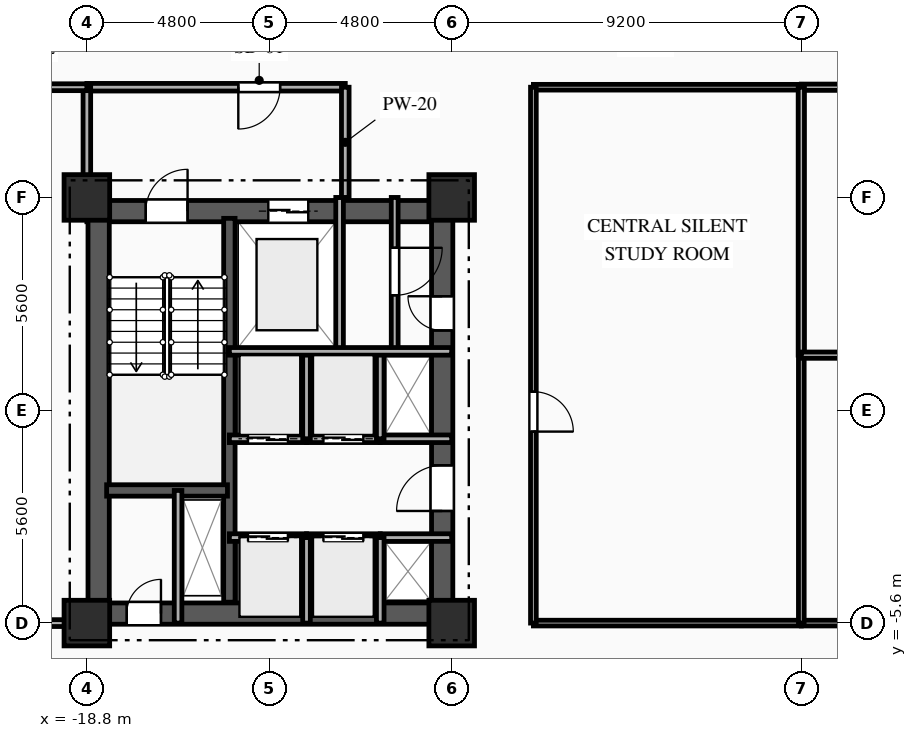
"""IFC4 building model, lengths in metres.
Left out: names, types, materials, properties, quantities, classifications, styles, units other than length and angle.
Written with IfcOpenShell. Run it as: python <this file> out.ifc"""

import sys

from ifc_helpers import new_model, si_unit, direction, frame, frame_2d, origin, origin_2d, place, context, subcontext, project, spatial, rectangle, extrude, element, fill, save


model = new_model("IFC4")
c1 = context("Model", 3, precision=1e-05, world=origin(), true_north=direction((0.0, 1.0)))
c2 = subcontext(c1, "Body", "Model", "MODEL_VIEW")
j1 = project(units=[si_unit("LENGTHUNIT", "METRE"), si_unit("PLANEANGLEUNIT", "RADIAN")], contexts=[c1])
p1 = place(None, origin())
s1 = spatial("IfcSite", under=j1, at=p1, CompositionType="ELEMENT")
p2 = place(p1, origin())
s2 = spatial("IfcBuilding", under=s1, at=p2, CompositionType="ELEMENT")
p3 = place(p2, frame((0.0, 0.0, 30.35)))
s3 = spatial("IfcBuildingStorey", under=s2, at=p3, CompositionType="ELEMENT", Elevation=30.35)
for number, where, z_axis, x_axis in (
    (1, (-18.8, -5.6, 0.0), (0.0, 0.0, 1.0), (1.0, 0.0, 0.0)),
    (2, (-18.8, 5.6, 0.0), (0.0, 0.0, 1.0), (1.0, 0.0, 0.0)),
    (3, (-9.2, -5.6, 0.0), (0.0, 0.0, 1.0), (1.0, 0.0, 0.0)),
    (4, (-9.2, 5.6, 0.0), (0.0, 0.0, 1.0), (1.0, 0.0, 0.0)),
):
    element("IfcColumn", number, at=place(p3, frame(where, z_axis=z_axis, x_axis=x_axis)), inside=s3, PredefinedType="COLUMN", context=c2, shape_type="SweptSolid", body=[
        extrude(rectangle(XDim=1.2, YDim=1.2, at=origin_2d()), origin(), (0.0, 0.0, 1.0), 3.35),
    ])
p4 = place(p3, frame((-18.8, 5.24, 0.0), z_axis=(0.0, 0.0, 1.0), x_axis=(1.0, 0.0, 0.0)))
e5 = element("IfcWall", 5, at=p4, inside=s3, PredefinedType="SHEAR", context=c2, shape_type="SweptSolid", body=[
    extrude(rectangle(XDim=9.6, YDim=0.56, at=frame_2d((4.8, 0.0))), origin(), (0.0, 0.0, 1.0), 3.035),
])
p5 = place(p4, frame((1.55, 0.0, 0.0)))
e6 = element("IfcOpeningElement", 6, at=p5, cuts=e5, PredefinedType="OPENING", context=c2, shape_type="SweptSolid", body=[
    extrude(rectangle(XDim=1.1, YDim=2.15, at=frame_2d((0.55, 1.075))), frame((0.0, 0.29, 0.0), z_axis=(0.0, -1.0, 0.0), x_axis=(1.0, 0.0, 0.0)), (0.0, 0.0, 1.0), 0.58),
])
p6 = place(p4, frame((4.775, 0.0, 0.0)))
e7 = element("IfcOpeningElement", 7, at=p6, cuts=e5, PredefinedType="OPENING", context=c2, shape_type="SweptSolid", body=[
    extrude(rectangle(XDim=1.05, YDim=2.1, at=frame_2d((0.525, 1.05))), frame((0.0, 0.29, 0.0), z_axis=(0.0, -1.0, 0.0), x_axis=(1.0, 0.0, 0.0)), (0.0, 0.0, 1.0), 0.58),
])
p7 = place(p3, frame((-18.8, -5.35, 0.0), z_axis=(0.0, 0.0, 1.0), x_axis=(1.0, 0.0, 0.0)))
e8 = element("IfcWall", 8, at=p7, inside=s3, PredefinedType="SHEAR", context=c2, shape_type="SweptSolid", body=[
    extrude(rectangle(XDim=9.6, YDim=0.56, at=frame_2d((4.8, 0.0))), origin(), (0.0, 0.0, 1.0), 3.035),
])
p8 = place(p7, frame((1.05, 0.0, 0.0)))
e9 = element("IfcOpeningElement", 9, at=p8, cuts=e8, PredefinedType="OPENING", context=c2, shape_type="SweptSolid", body=[
    extrude(rectangle(XDim=0.9, YDim=2.1, at=frame_2d((0.45, 1.05))), frame((0.0, 0.29, 0.0), z_axis=(0.0, -1.0, 0.0), x_axis=(1.0, 0.0, 0.0)), (0.0, 0.0, 1.0), 0.58),
])
p9 = place(p3, frame((-18.49, -5.05, 0.0), z_axis=(0.0, 0.0, 1.0), x_axis=(0.0, 1.0, 0.0)))
e10 = element("IfcWall", 10, at=p9, inside=s3, PredefinedType="SHEAR", context=c2, shape_type="SweptSolid", body=[
    extrude(rectangle(XDim=10.1, YDim=0.56, at=frame_2d((5.05, 0.0))), origin(), (0.0, 0.0, 1.0), 3.035),
])
p10 = place(p3, frame((-9.45, -5.05, 0.0), z_axis=(0.0, 0.0, 1.0), x_axis=(0.0, 1.0, 0.0)))
e11 = element("IfcWall", 11, at=p10, inside=s3, PredefinedType="SHEAR", context=c2, shape_type="SweptSolid", body=[
    extrude(rectangle(XDim=10.1, YDim=0.56, at=frame_2d((5.05, 0.0))), origin(), (0.0, 0.0, 1.0), 3.035),
])
p11 = place(p10, frame((7.15, 0.0, 0.0)))
e12 = element("IfcOpeningElement", 12, at=p11, cuts=e11, PredefinedType="OPENING", context=c2, shape_type="SweptSolid", body=[
    extrude(rectangle(XDim=0.9, YDim=2.1, at=frame_2d((0.45, 1.05))), frame((0.0, 0.29, 0.0), z_axis=(0.0, -1.0, 0.0), x_axis=(1.0, 0.0, 0.0)), (0.0, 0.0, 1.0), 0.58),
])
p12 = place(p10, frame((2.4, 0.0, 0.0)))
e13 = element("IfcOpeningElement", 13, at=p12, cuts=e11, PredefinedType="OPENING", context=c2, shape_type="SweptSolid", body=[
    extrude(rectangle(XDim=1.2, YDim=2.15, at=frame_2d((0.6, 1.075))), frame((0.0, 0.29, 0.0), z_axis=(0.0, -1.0, 0.0), x_axis=(1.0, 0.0, 0.0)), (0.0, 0.0, 1.0), 0.58),
])
p13 = place(p3, frame((-15.05, -5.05, 0.0), z_axis=(0.0, 0.0, 1.0), x_axis=(0.0, 1.0, 0.0)))
e14 = element("IfcWall", 14, at=p13, inside=s3, PredefinedType="SHEAR", context=c2, shape_type="SweptSolid", body=[
    extrude(rectangle(XDim=10.1, YDim=0.3, at=frame_2d((5.05, 0.0))), origin(), (0.0, 0.0, 1.0), 3.035),
])
p14 = place(p3, frame((-18.28, -2.11, 0.0), z_axis=(0.0, 0.0, 1.0), x_axis=(1.0, 0.0, 0.0)))
e15 = element("IfcWall", 15, at=p14, inside=s3, PredefinedType="SHEAR", context=c2, shape_type="SweptSolid", body=[
    extrude(rectangle(XDim=3.18, YDim=0.3, at=frame_2d((1.59, 0.0))), origin(), (0.0, 0.0, 1.0), 3.035),
])
p15 = place(p3, frame((-16.4, -5.6, 0.0), z_axis=(0.0, 0.0, 1.0), x_axis=(0.0, 1.0, 0.0)))
e16 = element("IfcWall", 16, at=p15, inside=s3, PredefinedType="PARTITIONING", context=c2, shape_type="SweptSolid", body=[
    extrude(rectangle(XDim=3.49, YDim=0.2, at=frame_2d((1.745, 0.0))), origin(), (0.0, 0.0, 1.0), 3.035),
])
p16 = place(p3, frame((-12.15, 1.55, 0.0), z_axis=(0.0, 0.0, 1.0), x_axis=(0.0, 1.0, 0.0)))
e17 = element("IfcWall", 17, at=p16, inside=s3, PredefinedType="PARTITIONING", context=c2, shape_type="SweptSolid", body=[
    extrude(rectangle(XDim=4.05, YDim=0.2, at=frame_2d((2.025, 0.0))), origin(), (0.0, 0.0, 1.0), 3.035),
])
p17 = place(p3, frame((-12.0, 8.5, 0.0), z_axis=(0.0, 0.0, 1.0), x_axis=(-1.0, 0.0, 0.0)))
e18 = element("IfcWall", 18, at=p17, inside=s3, PredefinedType="PARTITIONING", context=c2, shape_type="SweptSolid", body=[
    extrude(rectangle(XDim=6.8, YDim=0.2, at=frame_2d((3.4, 0.0))), origin(), (0.0, 0.0, 1.0), 3.035),
])
p18 = place(p17, frame((1.715, 0.0, 0.0)))
e19 = element("IfcOpeningElement", 19, at=p18, cuts=e18, PredefinedType="OPENING", context=c2, shape_type="SweptSolid", body=[
    extrude(rectangle(XDim=1.1, YDim=2.15, at=frame_2d((0.55, 1.075))), frame((0.0, 0.11, 0.0), z_axis=(0.0, -1.0, 0.0), x_axis=(1.0, 0.0, 0.0)), (0.0, 0.0, 1.0), 0.22),
])
p19 = place(p3, frame((-12.0, 5.6, 0.0), z_axis=(0.0, 0.0, 1.0), x_axis=(0.0, 1.0, 0.0)))
e20 = element("IfcWall", 20, at=p19, inside=s3, PredefinedType="PARTITIONING", context=c2, shape_type="SweptSolid", body=[
    extrude(rectangle(XDim=2.9, YDim=0.2, at=frame_2d((1.45, 0.0))), origin(), (0.0, 0.0, 1.0), 3.035),
])
p20 = place(p3, frame((-18.8, 8.5, 0.0), z_axis=(0.0, 0.0, 1.0), x_axis=(0.0, -1.0, 0.0)))
e21 = element("IfcWall", 21, at=p20, inside=s3, PredefinedType="PARTITIONING", context=c2, shape_type="SweptSolid", body=[
    extrude(rectangle(XDim=2.9, YDim=0.2, at=frame_2d((1.45, 0.0))), origin(), (0.0, 0.0, 1.0), 2.52),
])
p21 = place(p3, frame((-10.7, 5.6, 0.0), z_axis=(0.0, 0.0, 1.0), x_axis=(0.0, -1.0, 0.0)))
e22 = element("IfcWall", 22, at=p21, inside=s3, PredefinedType="PARTITIONING", context=c2, shape_type="SweptSolid", body=[
    extrude(rectangle(XDim=4.05, YDim=0.18, at=frame_2d((2.025, 0.0))), origin(), (0.0, 0.0, 1.0), 3.035),
])
p22 = place(p21, frame((1.325, 0.0, 0.0)))
e23 = element("IfcOpeningElement", 23, at=p22, cuts=e22, PredefinedType="OPENING", context=c2, shape_type="SweptSolid", body=[
    extrude(rectangle(XDim=1.25, YDim=2.2, at=frame_2d((0.625, 1.1))), frame((0.0, 0.1, 0.0), z_axis=(0.0, -1.0, 0.0), x_axis=(1.0, 0.0, 0.0)), (0.0, 0.0, 1.0), 0.2),
])
p23 = place(p3, frame((-15.05, -3.35, 0.0), z_axis=(0.0, 0.0, 1.0), x_axis=(1.0, 0.0, 0.0)))
e24 = element("IfcWall", 24, at=p23, inside=s3, PredefinedType="PARTITIONING", context=c2, shape_type="SweptSolid", body=[
    extrude(rectangle(XDim=2.03, YDim=0.2, at=frame_2d((1.015, 0.0))), origin(), (0.0, 0.0, 1.0), 3.035),
])
p24 = place(p23, frame((0.49, 0.0, 0.0)))
e25 = element("IfcOpeningElement", 25, at=p24, cuts=e24, PredefinedType="OPENING", context=c2, shape_type="SweptSolid", body=[
    extrude(rectangle(XDim=1.05, YDim=2.1, at=frame_2d((0.525, 1.05))), frame((0.0, 0.11, 0.0), z_axis=(0.0, -1.0, 0.0), x_axis=(1.0, 0.0, 0.0)), (0.0, 0.0, 1.0), 0.22),
])
p25 = place(p3, frame((-13.02, -3.35, 0.0), z_axis=(0.0, 0.0, 1.0), x_axis=(1.0, 0.0, 0.0)))
e26 = element("IfcWall", 26, at=p25, inside=s3, PredefinedType="PARTITIONING", context=c2, shape_type="SweptSolid", body=[
    extrude(rectangle(XDim=1.94, YDim=0.2, at=frame_2d((0.97, 0.0))), origin(), (0.0, 0.0, 1.0), 3.035),
])
p26 = place(p25, frame((0.445, 0.0, 0.0)))
e27 = element("IfcOpeningElement", 27, at=p26, cuts=e26, PredefinedType="OPENING", context=c2, shape_type="SweptSolid", body=[
    extrude(rectangle(XDim=1.05, YDim=2.1, at=frame_2d((0.525, 1.05))), frame((0.0, 0.11, 0.0), z_axis=(0.0, -1.0, 0.0), x_axis=(1.0, 0.0, 0.0)), (0.0, 0.0, 1.0), 0.22),
])
p27 = place(p3, frame((-11.08, -3.35, 0.0), z_axis=(0.0, 0.0, 1.0), x_axis=(1.0, 0.0, 0.0)))
e28 = element("IfcWall", 28, at=p27, inside=s3, PredefinedType="PARTITIONING", context=c2, shape_type="SweptSolid", body=[
    extrude(rectangle(XDim=1.88, YDim=0.2, at=frame_2d((0.94, 0.0))), origin(), (0.0, 0.0, 1.0), 2.75),
])
p28 = place(p3, frame((-13.02, -0.75, 0.0), z_axis=(0.0, 0.0, 1.0), x_axis=(-1.0, 0.0, 0.0)))
e29 = element("IfcWall", 29, at=p28, inside=s3, PredefinedType="PARTITIONING", context=c2, shape_type="SweptSolid", body=[
    extrude(rectangle(XDim=2.03, YDim=0.2, at=frame_2d((1.015, 0.0))), origin(), (0.0, 0.0, 1.0), 3.035),
])
p29 = place(p28, frame((0.49, 0.0, 0.0)))
e30 = element("IfcOpeningElement", 30, at=p29, cuts=e29, PredefinedType="OPENING", context=c2, shape_type="SweptSolid", body=[
    extrude(rectangle(XDim=1.05, YDim=2.1, at=frame_2d((0.525, 1.05))), frame((0.0, 0.11, 0.0), z_axis=(0.0, -1.0, 0.0), x_axis=(1.0, 0.0, 0.0)), (0.0, 0.0, 1.0), 0.22),
])
p30 = place(p3, frame((-11.08, -0.75, 0.0), z_axis=(0.0, 0.0, 1.0), x_axis=(-1.0, 0.0, 0.0)))
e31 = element("IfcWall", 31, at=p30, inside=s3, PredefinedType="PARTITIONING", context=c2, shape_type="SweptSolid", body=[
    extrude(rectangle(XDim=1.94, YDim=0.2, at=frame_2d((0.97, 0.0))), origin(), (0.0, 0.0, 1.0), 3.035),
])
p31 = place(p30, frame((0.445, 0.0, 0.0)))
e32 = element("IfcOpeningElement", 32, at=p31, cuts=e31, PredefinedType="OPENING", context=c2, shape_type="SweptSolid", body=[
    extrude(rectangle(XDim=1.05, YDim=2.1, at=frame_2d((0.525, 1.05))), frame((0.0, 0.11, 0.0), z_axis=(0.0, -1.0, 0.0), x_axis=(1.0, 0.0, 0.0)), (0.0, 0.0, 1.0), 0.22),
])
p32 = place(p3, frame((-9.2, -0.75, 0.0), z_axis=(0.0, 0.0, 1.0), x_axis=(-1.0, 0.0, 0.0)))
e33 = element("IfcWall", 33, at=p32, inside=s3, PredefinedType="PARTITIONING", context=c2, shape_type="SweptSolid", body=[
    extrude(rectangle(XDim=1.88, YDim=0.2, at=frame_2d((0.94, 0.0))), origin(), (0.0, 0.0, 1.0), 3.035),
])
for number, where, z_axis, x_axis in (
    (34, (-13.02, -5.6, 0.0), (0.0, 0.0, 1.0), (0.0, 1.0, 0.0)),
    (35, (-11.08, -5.6, 0.0), (0.0, 0.0, 1.0), (0.0, 1.0, 0.0)),
):
    element("IfcWall", number, at=place(p3, frame(where, z_axis=z_axis, x_axis=x_axis)), inside=s3, PredefinedType="PARTITIONING", context=c2, shape_type="SweptSolid", body=[
        extrude(rectangle(XDim=2.25, YDim=0.2, at=frame_2d((1.125, 0.0))), origin(), (0.0, 0.0, 1.0), 3.035),
    ])
for number, where, z_axis, x_axis in (
    (36, (-13.02, -0.75, 0.0), (0.0, 0.0, 1.0), (0.0, 1.0, 0.0)),
    (37, (-11.08, -0.75, 0.0), (0.0, 0.0, 1.0), (0.0, 1.0, 0.0)),
):
    element("IfcWall", number, at=place(p3, frame(where, z_axis=z_axis, x_axis=x_axis)), inside=s3, PredefinedType="PARTITIONING", context=c2, shape_type="SweptSolid", body=[
        extrude(rectangle(XDim=2.3, YDim=0.2, at=frame_2d((1.15, 0.0))), origin(), (0.0, 0.0, 1.0), 3.035),
    ])
p33 = place(p3, frame((-18.8, 8.5, 0.0), z_axis=(0.0, 0.0, 1.0), x_axis=(-1.0, 0.0, 0.0)))
e38 = element("IfcWall", 38, at=p33, inside=s3, PredefinedType="PARTITIONING", context=c2, shape_type="SweptSolid", body=[
    extrude(rectangle(XDim=2.65, YDim=0.18, at=frame_2d((1.325, 0.0))), origin(), (0.0, 0.0, 1.0), 3.035),
])
p34 = place(p33, frame((1.009, 0.0, 0.0)))
e39 = element("IfcOpeningElement", 39, at=p34, cuts=e38, PredefinedType="OPENING", context=c2, shape_type="SweptSolid", body=[
    extrude(rectangle(XDim=1.0, YDim=2.15, at=frame_2d((0.5, 1.075))), frame((0.0, 0.1, 0.0), z_axis=(0.0, -1.0, 0.0), x_axis=(1.0, 0.0, 0.0)), (0.0, 0.0, 1.0), 0.2),
])
p35 = place(p3, frame((0.0, 8.5, 0.0), z_axis=(0.0, 0.0, 1.0), x_axis=(-1.0, 0.0, 0.0)))
e40 = element("IfcWall", 40, at=p35, inside=s3, PredefinedType="PARTITIONING", context=c2, shape_type="SweptSolid", body=[
    extrude(rectangle(XDim=7.05, YDim=0.15, at=frame_2d((3.525, 0.0))), origin(), (0.0, 0.0, 1.0), 3.035),
])
p36 = place(p3, frame((7.05, 8.5, 0.0), z_axis=(0.0, 0.0, 1.0), x_axis=(-1.0, 0.0, 0.0)))
e41 = element("IfcWall", 41, at=p36, inside=s3, PredefinedType="PARTITIONING", context=c2, shape_type="SweptSolid", body=[
    extrude(rectangle(XDim=7.05, YDim=0.165, at=frame_2d((3.525, 0.0))), origin(), (0.0, 0.0, 1.0), 3.035),
])
p37 = place(p36, frame((4.728, 0.0, 0.0)))
e42 = element("IfcOpeningElement", 42, at=p37, cuts=e41, PredefinedType="OPENING", context=c2, shape_type="SweptSolid", body=[
    extrude(rectangle(XDim=1.15, YDim=2.15, at=frame_2d((0.575, 1.075))), frame((0.0, 0.093, 0.0), z_axis=(0.0, -1.0, 0.0), x_axis=(1.0, 0.0, 0.0)), (0.0, 0.0, 1.0), 0.185),
])
p38 = place(p3, frame((-21.45, -5.6, 0.0), z_axis=(0.0, 0.0, 1.0), x_axis=(1.0, 0.0, 0.0)))
e43 = element("IfcWall", 43, at=p38, inside=s3, PredefinedType="PARTITIONING", context=c2, shape_type="SweptSolid", body=[
    extrude(rectangle(XDim=2.65, YDim=0.18, at=frame_2d((1.325, 0.0))), origin(), (0.0, 0.0, 1.0), 3.035),
])
p39 = place(p3, frame((-7.05, -5.6, 0.0), z_axis=(0.0, 0.0, 1.0), x_axis=(1.0, 0.0, 0.0)))
e44 = element("IfcWall", 44, at=p39, inside=s3, PredefinedType="PARTITIONING", context=c2, shape_type="SweptSolid", body=[
    extrude(rectangle(XDim=7.05, YDim=0.15, at=frame_2d((3.525, 0.0))), origin(), (0.0, 0.0, 1.0), 2.52),
])
p40 = place(p3, frame((0.0, -5.6, 0.0), z_axis=(0.0, 0.0, 1.0), x_axis=(1.0, 0.0, 0.0)))
e45 = element("IfcWall", 45, at=p40, inside=s3, PredefinedType="PARTITIONING", context=c2, shape_type="SweptSolid", body=[
    extrude(rectangle(XDim=7.05, YDim=0.15, at=frame_2d((3.525, 0.0))), origin(), (0.0, 0.0, 1.0), 2.52),
])
p41 = place(p40, frame((1.185, 0.0, 0.0)))
e46 = element("IfcOpeningElement", 46, at=p41, cuts=e45, PredefinedType="OPENING", context=c2, shape_type="SweptSolid", body=[
    extrude(rectangle(XDim=1.05, YDim=2.15, at=frame_2d((0.525, 1.075))), frame((0.0, 0.085, 0.0), z_axis=(0.0, -1.0, 0.0), x_axis=(1.0, 0.0, 0.0)), (0.0, 0.0, 1.0), 0.17),
])
p42 = place(p3, frame((-7.05, 8.5, 0.0), z_axis=(0.0, 0.0, 1.0), x_axis=(0.0, -1.0, 0.0)))
e47 = element("IfcWall", 47, at=p42, inside=s3, PredefinedType="PARTITIONING", context=c2, shape_type="SweptSolid", body=[
    extrude(rectangle(XDim=14.1, YDim=0.15, at=frame_2d((7.05, 0.0))), origin(), (0.0, 0.0, 1.0), 3.035),
])
p43 = place(p42, frame((8.011, 0.0, 0.0)))
e48 = element("IfcOpeningElement", 48, at=p43, cuts=e47, PredefinedType="OPENING", context=c2, shape_type="SweptSolid", body=[
    extrude(rectangle(XDim=1.05, YDim=2.15, at=frame_2d((0.525, 1.075))), frame((0.0, 0.085, 0.0), z_axis=(0.0, -1.0, 0.0), x_axis=(1.0, 0.0, 0.0)), (0.0, 0.0, 1.0), 0.17),
])
p44 = place(p3, frame((0.0, 1.45, 0.0), z_axis=(0.0, 0.0, 1.0), x_axis=(0.0, -1.0, 0.0)))
e49 = element("IfcWall", 49, at=p44, inside=s3, PredefinedType="PARTITIONING", context=c2, shape_type="SweptSolid", body=[
    extrude(rectangle(XDim=7.05, YDim=0.15, at=frame_2d((3.525, 0.0))), origin(), (0.0, 0.0, 1.0), 3.035),
])
for number, where, z_axis, x_axis in (
    (50, (0.0, 8.5, 0.0), (0.0, 0.0, 1.0), (0.0, -1.0, 0.0)),
    (51, (0.0, 1.45, 0.0), (0.0, 0.0, 1.0), (1.0, 0.0, 0.0)),
):
    element("IfcWall", number, at=place(p3, frame(where, z_axis=z_axis, x_axis=x_axis)), inside=s3, PredefinedType="PARTITIONING", context=c2, shape_type="SweptSolid", body=[
        extrude(rectangle(XDim=7.05, YDim=0.165, at=frame_2d((3.525, 0.0))), origin(), (0.0, 0.0, 1.0), 3.035),
    ])
p45 = place(p3, frame((-15.05, 1.55, 0.0), z_axis=(0.0, 0.0, 1.0), x_axis=(1.0, 0.0, 0.0)))
e52 = element("IfcWall", 52, at=p45, inside=s3, PredefinedType="PARTITIONING", context=c2, shape_type="SweptSolid", body=[
    extrude(rectangle(XDim=5.85, YDim=0.2, at=frame_2d((2.925, 0.0))), origin(), (0.0, 0.0, 1.0), 3.035),
])
p46 = place(p5, origin())
e53 = element("IfcDoor", 53, at=p46, inside=s3, OperationType="SINGLE_SWING_RIGHT", PredefinedType="DOOR", context=c2, shape_type="SweptSolid", body=[
    extrude(rectangle(XDim=1.1, YDim=2.15, at=frame_2d((0.55, 1.075))), frame((0.0, 0.025, 0.0), z_axis=(0.0, -1.0, 0.0), x_axis=(1.0, 0.0, 0.0)), (0.0, 0.0, 1.0), 0.05),
])
fill(e6, e53)
p47 = place(p6, origin())
e54 = element("IfcDoor", 54, at=p47, inside=s3, OperationType="DOUBLE_DOOR_SLIDING", PredefinedType="DOOR", context=c2, shape_type="SweptSolid", body=[
    extrude(rectangle(XDim=1.05, YDim=2.1, at=frame_2d((0.525, 1.05))), frame((0.0, 0.025, 0.0), z_axis=(0.0, -1.0, 0.0), x_axis=(1.0, 0.0, 0.0)), (0.0, 0.0, 1.0), 0.05),
])
fill(e7, e54)
p48 = place(p8, origin())
e55 = element("IfcDoor", 55, at=p48, inside=s3, OperationType="SINGLE_SWING_RIGHT", PredefinedType="DOOR", context=c2, shape_type="SweptSolid", body=[
    extrude(rectangle(XDim=0.9, YDim=2.1, at=frame_2d((0.45, 1.05))), frame((0.0, 0.025, 0.0), z_axis=(0.0, -1.0, 0.0), x_axis=(1.0, 0.0, 0.0)), (0.0, 0.0, 1.0), 0.05),
])
fill(e9, e55)
p49 = place(p18, origin())
e56 = element("IfcDoor", 56, at=p49, inside=s3, OperationType="SINGLE_SWING_RIGHT", PredefinedType="DOOR", context=c2, shape_type="SweptSolid", body=[
    extrude(rectangle(XDim=1.1, YDim=2.15, at=frame_2d((0.55, 1.075))), frame((0.0, 0.025, 0.0), z_axis=(0.0, -1.0, 0.0), x_axis=(1.0, 0.0, 0.0)), (0.0, 0.0, 1.0), 0.05),
])
fill(e19, e56)
p50 = place(p22, origin())
e57 = element("IfcDoor", 57, at=p50, inside=s3, OperationType="SINGLE_SWING_LEFT", PredefinedType="DOOR", context=c2, shape_type="SweptSolid", body=[
    extrude(rectangle(XDim=1.25, YDim=2.2, at=frame_2d((0.625, 1.1))), frame((0.0, 0.025, 0.0), z_axis=(0.0, -1.0, 0.0), x_axis=(1.0, 0.0, 0.0)), (0.0, 0.0, 1.0), 0.05),
])
fill(e23, e57)
p51 = place(p11, origin())
e58 = element("IfcDoor", 58, at=p51, inside=s3, OperationType="SINGLE_SWING_RIGHT", PredefinedType="DOOR", context=c2, shape_type="SweptSolid", body=[
    extrude(rectangle(XDim=0.9, YDim=2.1, at=frame_2d((0.45, 1.05))), frame((0.0, 0.025, 0.0), z_axis=(0.0, -1.0, 0.0), x_axis=(1.0, 0.0, 0.0)), (0.0, 0.0, 1.0), 0.05),
])
fill(e12, e58)
p52 = place(p24, origin())
e59 = element("IfcDoor", 59, at=p52, inside=s3, OperationType="DOUBLE_DOOR_SLIDING", PredefinedType="DOOR", context=c2, shape_type="SweptSolid", body=[
    extrude(rectangle(XDim=1.05, YDim=2.1, at=frame_2d((0.525, 1.05))), frame((0.0, 0.025, 0.0), z_axis=(0.0, -1.0, 0.0), x_axis=(1.0, 0.0, 0.0)), (0.0, 0.0, 1.0), 0.05),
])
fill(e25, e59)
p53 = place(p26, origin())
e60 = element("IfcDoor", 60, at=p53, inside=s3, OperationType="DOUBLE_DOOR_SLIDING", PredefinedType="DOOR", context=c2, shape_type="SweptSolid", body=[
    extrude(rectangle(XDim=1.05, YDim=2.1, at=frame_2d((0.525, 1.05))), frame((0.0, 0.025, 0.0), z_axis=(0.0, -1.0, 0.0), x_axis=(1.0, 0.0, 0.0)), (0.0, 0.0, 1.0), 0.05),
])
fill(e27, e60)
p54 = place(p29, origin())
e61 = element("IfcDoor", 61, at=p54, inside=s3, OperationType="DOUBLE_DOOR_SLIDING", PredefinedType="DOOR", context=c2, shape_type="SweptSolid", body=[
    extrude(rectangle(XDim=1.05, YDim=2.1, at=frame_2d((0.525, 1.05))), frame((0.0, 0.025, 0.0), z_axis=(0.0, -1.0, 0.0), x_axis=(1.0, 0.0, 0.0)), (0.0, 0.0, 1.0), 0.05),
])
fill(e30, e61)
p55 = place(p31, origin())
e62 = element("IfcDoor", 62, at=p55, inside=s3, OperationType="DOUBLE_DOOR_SLIDING", PredefinedType="DOOR", context=c2, shape_type="SweptSolid", body=[
    extrude(rectangle(XDim=1.05, YDim=2.1, at=frame_2d((0.525, 1.05))), frame((0.0, 0.025, 0.0), z_axis=(0.0, -1.0, 0.0), x_axis=(1.0, 0.0, 0.0)), (0.0, 0.0, 1.0), 0.05),
])
fill(e32, e62)
p56 = place(p12, origin())
e63 = element("IfcDoor", 63, at=p56, inside=s3, OperationType="SINGLE_SWING_LEFT", PredefinedType="DOOR", context=c2, shape_type="SweptSolid", body=[
    extrude(rectangle(XDim=1.2, YDim=2.15, at=frame_2d((0.6, 1.075))), frame((0.0, 0.025, 0.0), z_axis=(0.0, -1.0, 0.0), x_axis=(1.0, 0.0, 0.0)), (0.0, 0.0, 1.0), 0.05),
])
fill(e13, e63)
p57 = place(p43, origin())
e64 = element("IfcDoor", 64, at=p57, inside=s3, OperationType="SINGLE_SWING_RIGHT", PredefinedType="DOOR", context=c2, shape_type="SweptSolid", body=[
    extrude(rectangle(XDim=1.05, YDim=2.15, at=frame_2d((0.525, 1.075))), frame((0.0, 0.025, 0.0), z_axis=(0.0, -1.0, 0.0), x_axis=(1.0, 0.0, 0.0)), (0.0, 0.0, 1.0), 0.05),
])
fill(e48, e64)
save(model, sys.argv[1])
